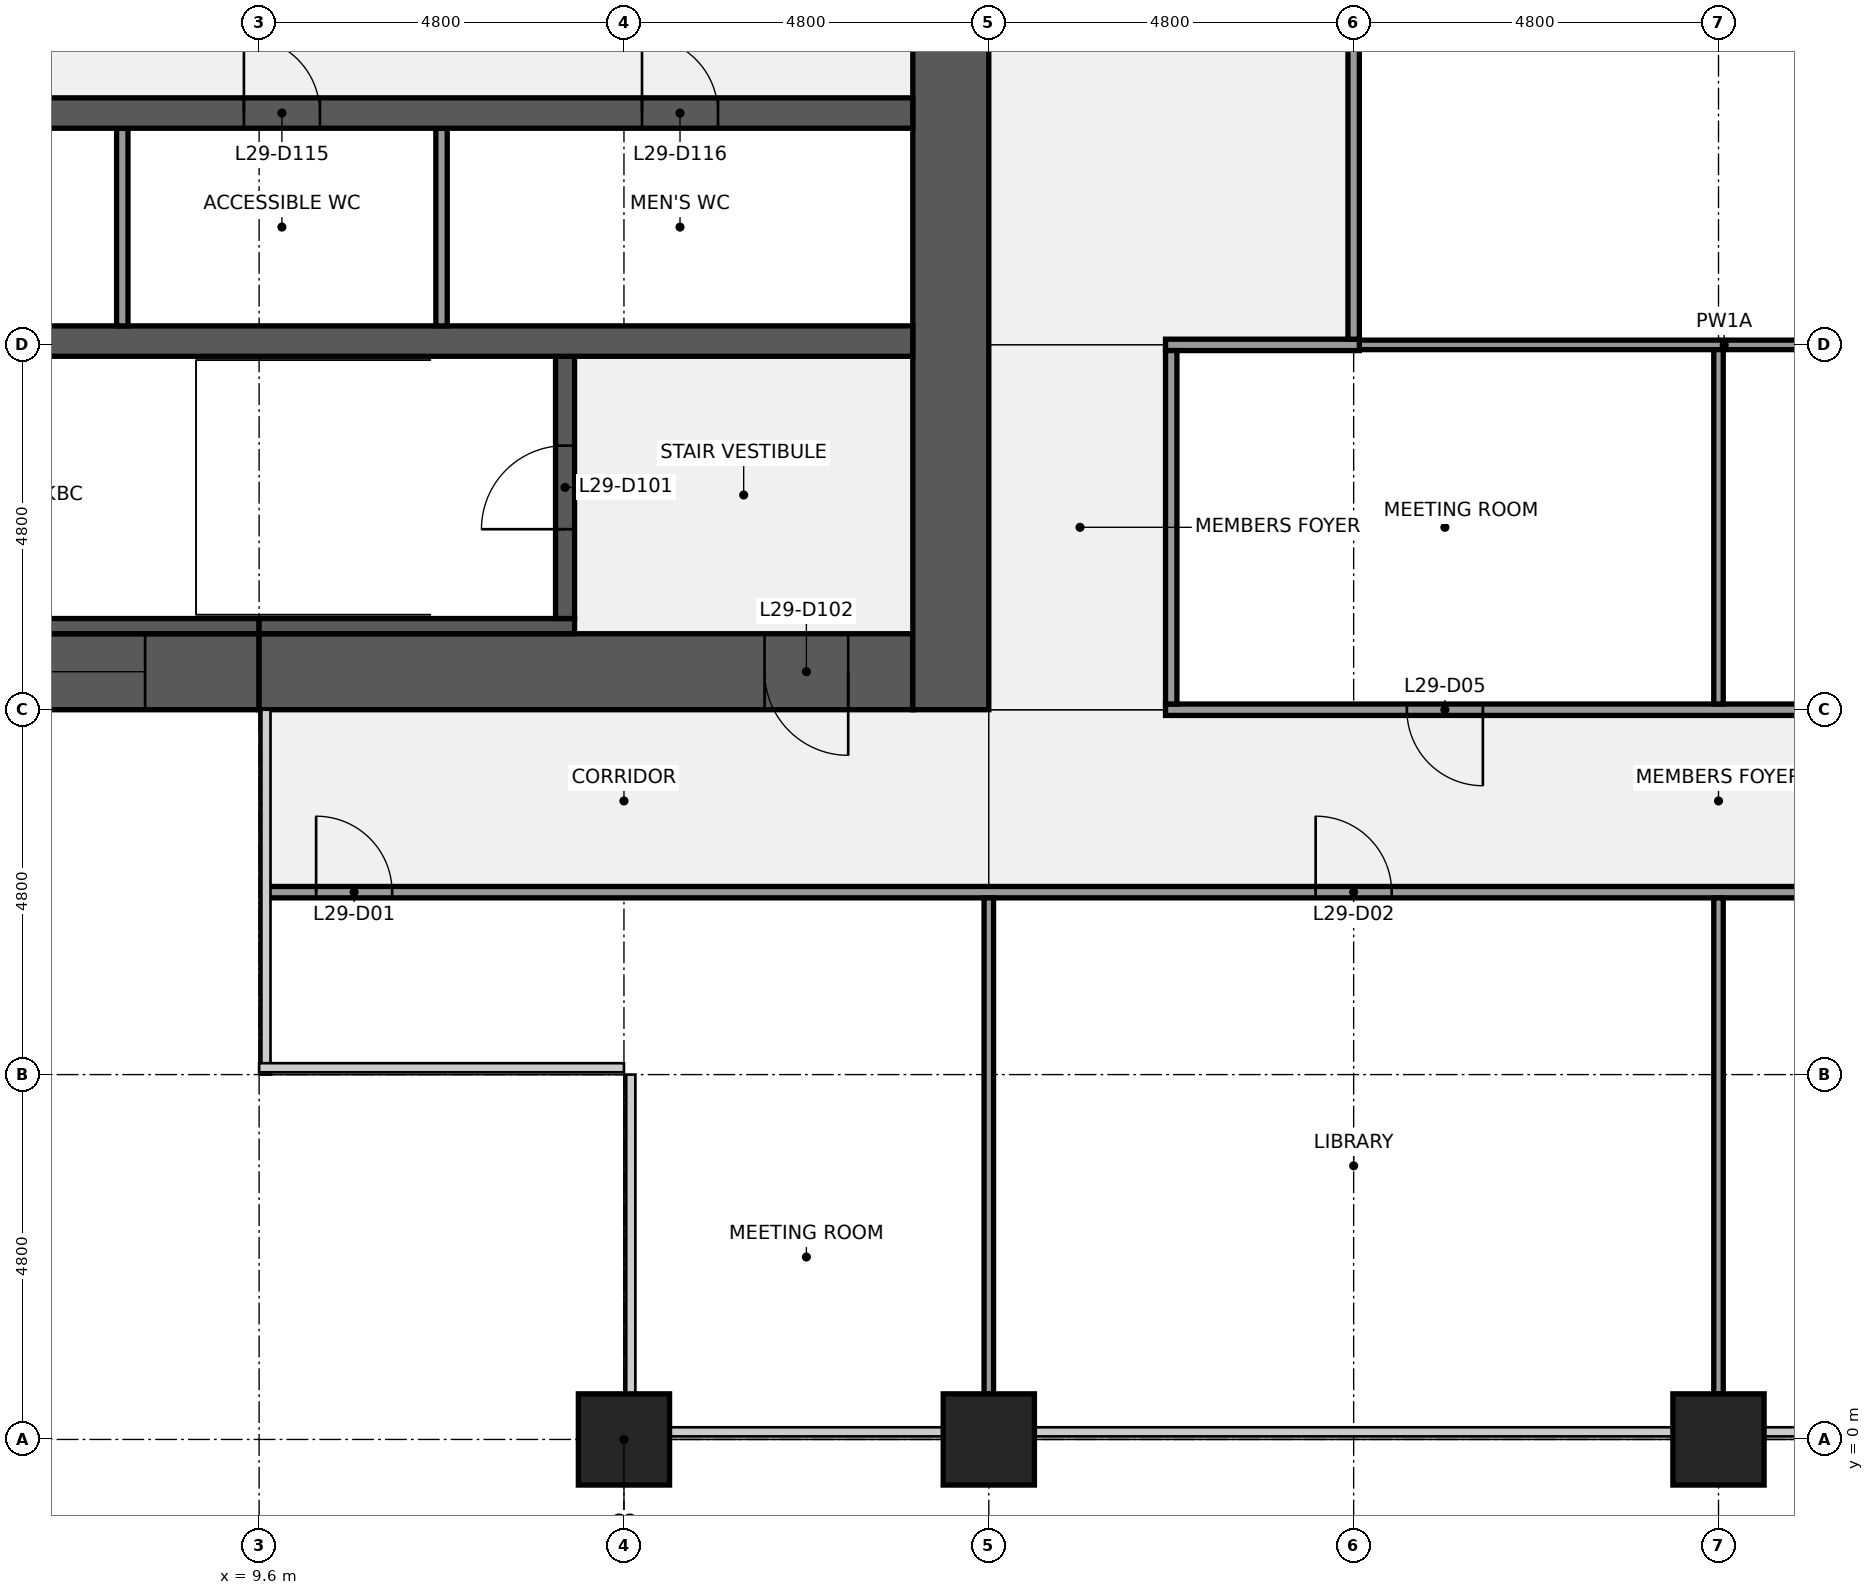
"""IFC4 building model, lengths in metres.
Left out: names, types, materials, properties, quantities, classifications, styles, units other than length and angle.
Written with IfcOpenShell. Run it as: python <this file> out.ifc"""

import sys

from ifc_helpers import new_model, si_unit, direction, frame, frame_2d, origin, origin_2d, place, context, subcontext, project, spatial, rectangle, extrude, element, fill, save


model = new_model("IFC4")
c1 = context("Model", 3, precision=1e-05, world=origin(), true_north=direction((0.0, 1.0)))
c2 = subcontext(c1, "Body", "Model", "MODEL_VIEW")
j1 = project(units=[si_unit("LENGTHUNIT", "METRE"), si_unit("PLANEANGLEUNIT", "RADIAN")], contexts=[c1])
p1 = place(None, origin())
s1 = spatial("IfcSite", under=j1, at=p1, CompositionType="ELEMENT")
p2 = place(p1, origin())
s2 = spatial("IfcBuilding", under=s1, at=p2, CompositionType="ELEMENT")
p3 = place(p2, frame((0.0, 0.0, 136.1)))
s3 = spatial("IfcBuildingStorey", under=s2, at=p3, CompositionType="ELEMENT", Elevation=136.1)
for number, where, z_axis, x_axis in (
    (1, (14.4, 0.0, 0.0), (0.0, 0.0, 1.0), (1.0, 0.0, 0.0)),
    (2, (19.2, 0.0, 0.0), (0.0, 0.0, 1.0), (1.0, 0.0, 0.0)),
    (3, (28.8, 0.0, 0.0), (0.0, 0.0, 1.0), (1.0, 0.0, 0.0)),
):
    element("IfcColumn", number, at=place(p3, frame(where, z_axis=z_axis, x_axis=x_axis)), inside=s3, PredefinedType="COLUMN", context=c2, shape_type="SweptSolid", body=[
        extrude(rectangle(XDim=1.2, YDim=1.2, at=origin_2d()), origin(), (0.0, 0.0, 1.0), 4.0),
    ])
p4 = place(p3, frame((9.6, 10.1, 0.0), z_axis=(0.0, 0.0, 1.0), x_axis=(-1.0, 0.0, 0.0)))
e4 = element("IfcWall", 4, at=p4, inside=s3, PredefinedType="SHEAR", context=c2, shape_type="SweptSolid", body=[
    extrude(rectangle(XDim=8.6, YDim=1.0, at=frame_2d((4.3, 0.0))), origin(), (0.0, 0.0, 1.0), 3.84),
])
p5 = place(p4, frame((1.5, 0.0, 0.9)))
e5 = element("IfcOpeningElement", 5, at=p5, cuts=e4, PredefinedType="OPENING", context=c2, shape_type="SweptSolid", body=[
    extrude(rectangle(XDim=1.8, YDim=1.5, at=frame_2d((0.9, 0.75))), frame((0.0, 0.51, 0.0), z_axis=(0.0, -1.0, 0.0), x_axis=(1.0, 0.0, 0.0)), (0.0, 0.0, 1.0), 1.02),
])
p6 = place(p3, frame((18.2, 10.1, 0.0), z_axis=(0.0, 0.0, 1.0), x_axis=(-1.0, 0.0, 0.0)))
e6 = element("IfcWall", 6, at=p6, inside=s3, PredefinedType="SHEAR", context=c2, shape_type="SweptSolid", body=[
    extrude(rectangle(XDim=8.6, YDim=1.0, at=frame_2d((4.3, 0.0))), origin(), (0.0, 0.0, 1.0), 3.84),
])
p7 = place(p6, frame((0.85, 0.0, 0.0)))
e7 = element("IfcOpeningElement", 7, at=p7, cuts=e6, PredefinedType="OPENING", context=c2, shape_type="SweptSolid", body=[
    extrude(rectangle(XDim=1.1, YDim=2.1, at=frame_2d((0.55, 1.05))), frame((0.0, 0.51, 0.0), z_axis=(0.0, -1.0, 0.0), x_axis=(1.0, 0.0, 0.0)), (0.0, 0.0, 1.0), 1.02),
])
p8 = place(p3, frame((18.7, 38.4, 0.0), z_axis=(0.0, 0.0, 1.0), x_axis=(0.0, -1.0, 0.0)))
e8 = element("IfcWall", 8, at=p8, inside=s3, PredefinedType="SHEAR", context=c2, shape_type="SweptSolid", body=[
    extrude(rectangle(XDim=28.8, YDim=1.0, at=frame_2d((14.4, 0.0))), origin(), (0.0, 0.0, 1.0), 3.84),
])
p9 = place(p8, frame((18.3, 0.0, 0.0)))
e9 = element("IfcOpeningElement", 9, at=p9, cuts=e8, PredefinedType="OPENING", context=c2, shape_type="SweptSolid", body=[
    extrude(rectangle(XDim=1.8, YDim=2.1, at=frame_2d((0.9, 1.05))), frame((0.0, 0.51, 0.0), z_axis=(0.0, -1.0, 0.0), x_axis=(1.0, 0.0, 0.0)), (0.0, 0.0, 1.0), 1.02),
])
p10 = place(p8, frame((8.7, 0.0, 0.0)))
e10 = element("IfcOpeningElement", 10, at=p10, cuts=e8, PredefinedType="OPENING", context=c2, shape_type="SweptSolid", body=[
    extrude(rectangle(XDim=1.8, YDim=2.1, at=frame_2d((0.9, 1.05))), frame((0.0, 0.51, 0.0), z_axis=(0.0, -1.0, 0.0), x_axis=(1.0, 0.0, 0.0)), (0.0, 0.0, 1.0), 1.02),
])
p11 = place(p3, frame((6.25, 10.7, 0.0), z_axis=(0.0, 0.0, 1.0), x_axis=(1.0, 0.0, 0.0)))
e11 = element("IfcWall", 11, at=p11, inside=s3, PredefinedType="SHEAR", context=c2, shape_type="SweptSolid", body=[
    extrude(rectangle(XDim=3.35, YDim=0.2, at=frame_2d((1.675, 0.0))), origin(), (0.0, 0.0, 1.0), 3.84),
])
p12 = place(p3, frame((9.6, 10.7, 0.0), z_axis=(0.0, 0.0, 1.0), x_axis=(1.0, 0.0, 0.0)))
e12 = element("IfcWall", 12, at=p12, inside=s3, PredefinedType="SHEAR", context=c2, shape_type="SweptSolid", body=[
    extrude(rectangle(XDim=4.15, YDim=0.2, at=frame_2d((2.075, 0.0))), origin(), (0.0, 0.0, 1.0), 3.84),
])
p13 = place(p3, frame((13.625, 10.8, 0.0), z_axis=(0.0, 0.0, 1.0), x_axis=(0.0, 1.0, 0.0)))
e13 = element("IfcWall", 13, at=p13, inside=s3, PredefinedType="SHEAR", context=c2, shape_type="SweptSolid", body=[
    extrude(rectangle(XDim=3.45, YDim=0.25, at=frame_2d((1.725, 0.0))), origin(), (0.0, 0.0, 1.0), 3.84),
])
p14 = place(p13, frame((1.175, 0.0, 0.0)))
e14 = element("IfcOpeningElement", 14, at=p14, cuts=e13, PredefinedType="OPENING", context=c2, shape_type="SweptSolid", body=[
    extrude(rectangle(XDim=1.1, YDim=2.1, at=frame_2d((0.55, 1.05))), frame((0.0, 0.135, 0.0), z_axis=(0.0, -1.0, 0.0), x_axis=(1.0, 0.0, 0.0)), (0.0, 0.0, 1.0), 0.27),
])
p15 = place(p3, frame((1.0, 14.45, 0.0), z_axis=(0.0, 0.0, 1.0), x_axis=(1.0, 0.0, 0.0)))
e15 = element("IfcWall", 15, at=p15, inside=s3, PredefinedType="SHEAR", context=c2, shape_type="SweptSolid", body=[
    extrude(rectangle(XDim=17.2, YDim=0.4, at=frame_2d((8.6, 0.0))), origin(), (0.0, 0.0, 1.0), 3.84),
])
for number, where, z_axis, x_axis in (
    (16, (7.8, 14.65, 0.0), (0.0, 0.0, 1.0), (0.0, 1.0, 0.0)),
    (17, (12.0, 14.65, 0.0), (0.0, 0.0, 1.0), (0.0, 1.0, 0.0)),
):
    element("IfcWall", number, at=place(p3, frame(where, z_axis=z_axis, x_axis=x_axis)), inside=s3, PredefinedType="PARTITIONING", context=c2, shape_type="SweptSolid", body=[
        extrude(rectangle(XDim=2.6, YDim=0.15, at=frame_2d((1.3, 0.0))), origin(), (0.0, 0.0, 1.0), 3.84),
    ])
p16 = place(p3, frame((1.0, 17.45, 0.0), z_axis=(0.0, 0.0, 1.0), x_axis=(1.0, 0.0, 0.0)))
e18 = element("IfcWall", 18, at=p16, inside=s3, PredefinedType="SHEAR", context=c2, shape_type="SweptSolid", body=[
    extrude(rectangle(XDim=17.2, YDim=0.4, at=frame_2d((8.6, 0.0))), origin(), (0.0, 0.0, 1.0), 3.84),
])
p17 = place(p16, frame((0.762, 0.0, 0.0)))
e19 = element("IfcOpeningElement", 19, at=p17, cuts=e18, PredefinedType="OPENING", context=c2, shape_type="SweptSolid", body=[
    extrude(rectangle(XDim=1.0, YDim=2.1, at=frame_2d((0.5, 1.05))), frame((0.0, 0.21, 0.0), z_axis=(0.0, -1.0, 0.0), x_axis=(1.0, 0.0, 0.0)), (0.0, 0.0, 1.0), 0.42),
])
p18 = place(p16, frame((4.2, 0.0, 0.0)))
e20 = element("IfcOpeningElement", 20, at=p18, cuts=e18, PredefinedType="OPENING", context=c2, shape_type="SweptSolid", body=[
    extrude(rectangle(XDim=1.0, YDim=2.1, at=frame_2d((0.5, 1.05))), frame((0.0, 0.21, 0.0), z_axis=(0.0, -1.0, 0.0), x_axis=(1.0, 0.0, 0.0)), (0.0, 0.0, 1.0), 0.42),
])
p19 = place(p16, frame((8.4, 0.0, 0.0)))
e21 = element("IfcOpeningElement", 21, at=p19, cuts=e18, PredefinedType="OPENING", context=c2, shape_type="SweptSolid", body=[
    extrude(rectangle(XDim=1.0, YDim=2.1, at=frame_2d((0.5, 1.05))), frame((0.0, 0.21, 0.0), z_axis=(0.0, -1.0, 0.0), x_axis=(1.0, 0.0, 0.0)), (0.0, 0.0, 1.0), 0.42),
])
p20 = place(p16, frame((13.637, 0.0, 0.0)))
e22 = element("IfcOpeningElement", 22, at=p20, cuts=e18, PredefinedType="OPENING", context=c2, shape_type="SweptSolid", body=[
    extrude(rectangle(XDim=1.0, YDim=2.1, at=frame_2d((0.5, 1.05))), frame((0.0, 0.21, 0.0), z_axis=(0.0, -1.0, 0.0), x_axis=(1.0, 0.0, 0.0)), (0.0, 0.0, 1.0), 0.42),
])
p21 = place(p3, frame((9.7, 7.2, 0.0), z_axis=(0.0, 0.0, 1.0), x_axis=(1.0, 0.0, 0.0)))
e23 = element("IfcWall", 23, at=p21, inside=s3, PredefinedType="PARTITIONING", context=c2, shape_type="SweptSolid", body=[
    extrude(rectangle(XDim=38.2, YDim=0.15, at=frame_2d((19.1, 0.0))), origin(), (0.0, 0.0, 1.0), 2.849),
])
p22 = place(p21, frame((0.65, 0.0, 0.0)))
e24 = element("IfcOpeningElement", 24, at=p22, cuts=e23, PredefinedType="OPENING", context=c2, shape_type="SweptSolid", body=[
    extrude(rectangle(XDim=1.0, YDim=2.1, at=frame_2d((0.5, 1.05))), frame((0.0, 0.085, 0.0), z_axis=(0.0, -1.0, 0.0), x_axis=(1.0, 0.0, 0.0)), (0.0, 0.0, 1.0), 0.17),
])
p23 = place(p21, frame((13.8, 0.0, 0.0)))
e25 = element("IfcOpeningElement", 25, at=p23, cuts=e23, PredefinedType="OPENING", context=c2, shape_type="SweptSolid", body=[
    extrude(rectangle(XDim=1.0, YDim=2.1, at=frame_2d((0.5, 1.05))), frame((0.0, 0.085, 0.0), z_axis=(0.0, -1.0, 0.0), x_axis=(1.0, 0.0, 0.0)), (0.0, 0.0, 1.0), 0.17),
])
p24 = place(p21, frame((23.4, 0.0, 0.0)))
e26 = element("IfcOpeningElement", 26, at=p24, cuts=e23, PredefinedType="OPENING", context=c2, shape_type="SweptSolid", body=[
    extrude(rectangle(XDim=1.0, YDim=2.1, at=frame_2d((0.5, 1.05))), frame((0.0, 0.085, 0.0), z_axis=(0.0, -1.0, 0.0), x_axis=(1.0, 0.0, 0.0)), (0.0, 0.0, 1.0), 0.17),
])
p25 = place(p21, frame((32.95, 0.0, 0.0)))
e27 = element("IfcOpeningElement", 27, at=p25, cuts=e23, PredefinedType="OPENING", context=c2, shape_type="SweptSolid", body=[
    extrude(rectangle(XDim=1.0, YDim=2.1, at=frame_2d((0.5, 1.05))), frame((0.0, 0.085, 0.0), z_axis=(0.0, -1.0, 0.0), x_axis=(1.0, 0.0, 0.0)), (0.0, 0.0, 1.0), 0.17),
])
p26 = place(p3, frame((21.525, 9.6, 0.0), z_axis=(0.0, 0.0, 1.0), x_axis=(1.0, 0.0, 0.0)))
e28 = element("IfcWall", 28, at=p26, inside=s3, PredefinedType="PARTITIONING", context=c2, shape_type="SweptSolid", body=[
    extrude(rectangle(XDim=14.55, YDim=0.15, at=frame_2d((7.275, 0.0))), origin(), (0.0, 0.0, 1.0), 2.849),
])
p27 = place(p26, frame((3.175, 0.0, 0.0)))
e29 = element("IfcOpeningElement", 29, at=p27, cuts=e28, PredefinedType="OPENING", context=c2, shape_type="SweptSolid", body=[
    extrude(rectangle(XDim=1.0, YDim=2.1, at=frame_2d((0.5, 1.05))), frame((0.0, 0.085, 0.0), z_axis=(0.0, -1.0, 0.0), x_axis=(1.0, 0.0, 0.0)), (0.0, 0.0, 1.0), 0.17),
])
p28 = place(p26, frame((10.375, 0.0, 0.0)))
e30 = element("IfcOpeningElement", 30, at=p28, cuts=e28, PredefinedType="OPENING", context=c2, shape_type="SweptSolid", body=[
    extrude(rectangle(XDim=1.0, YDim=2.1, at=frame_2d((0.5, 1.05))), frame((0.0, 0.085, 0.0), z_axis=(0.0, -1.0, 0.0), x_axis=(1.0, 0.0, 0.0)), (0.0, 0.0, 1.0), 0.17),
])
p29 = place(p3, frame((24.075, 14.4, 0.0), z_axis=(0.0, 0.0, 1.0), x_axis=(1.0, 0.0, 0.0)))
e31 = element("IfcWall", 31, at=p29, inside=s3, PredefinedType="PARTITIONING", context=c2, shape_type="SweptSolid", body=[
    extrude(rectangle(XDim=9.6, YDim=0.125, at=frame_2d((4.8, 0.0))), origin(), (0.0, 0.0, 1.0), 2.849),
])
p30 = place(p3, frame((21.525, 14.4, 0.0), z_axis=(0.0, 0.0, 1.0), x_axis=(1.0, 0.0, 0.0)))
e32 = element("IfcWall", 32, at=p30, inside=s3, PredefinedType="PARTITIONING", context=c2, shape_type="SweptSolid", body=[
    extrude(rectangle(XDim=2.55, YDim=0.15, at=frame_2d((1.275, 0.0))), origin(), (0.0, 0.0, 1.0), 2.849),
])
p31 = place(p3, frame((19.2, 0.6, 0.0), z_axis=(0.0, 0.0, 1.0), x_axis=(0.0, 1.0, 0.0)))
e33 = element("IfcWall", 33, at=p31, inside=s3, PredefinedType="PARTITIONING", context=c2, shape_type="SweptSolid", body=[
    extrude(rectangle(XDim=6.525, YDim=0.125, at=frame_2d((3.262, 0.0))), origin(), (0.0, 0.0, 1.0), 2.849),
])
p32 = place(p3, frame((21.6, 9.675, 0.0), z_axis=(0.0, 0.0, 1.0), x_axis=(0.0, 1.0, 0.0)))
e34 = element("IfcWall", 34, at=p32, inside=s3, PredefinedType="PARTITIONING", context=c2, shape_type="SweptSolid", body=[
    extrude(rectangle(XDim=4.65, YDim=0.15, at=frame_2d((2.325, 0.0))), origin(), (0.0, 0.0, 1.0), 2.849),
])
p33 = place(p3, frame((24.0, 14.475, 0.0), z_axis=(0.0, 0.0, 1.0), x_axis=(0.0, 1.0, 0.0)))
e35 = element("IfcWall", 35, at=p33, inside=s3, PredefinedType="PARTITIONING", context=c2, shape_type="SweptSolid", body=[
    extrude(rectangle(XDim=10.65, YDim=0.15, at=frame_2d((5.325, 0.0))), origin(), (0.0, 0.0, 1.0), 2.849),
])
p34 = place(p33, frame((4.825, 0.0, 0.0)))
e36 = element("IfcOpeningElement", 36, at=p34, cuts=e35, PredefinedType="OPENING", context=c2, shape_type="SweptSolid", body=[
    extrude(rectangle(XDim=1.0, YDim=2.1, at=frame_2d((0.5, 1.05))), frame((0.0, 0.085, 0.0), z_axis=(0.0, -1.0, 0.0), x_axis=(1.0, 0.0, 0.0)), (0.0, 0.0, 1.0), 0.17),
])
p35 = place(p3, frame((28.8, 0.6, 0.0), z_axis=(0.0, 0.0, 1.0), x_axis=(0.0, 1.0, 0.0)))
e37 = element("IfcWall", 37, at=p35, inside=s3, PredefinedType="PARTITIONING", context=c2, shape_type="SweptSolid", body=[
    extrude(rectangle(XDim=6.525, YDim=0.125, at=frame_2d((3.262, 0.0))), origin(), (0.0, 0.0, 1.0), 2.849),
])
p36 = place(p3, frame((28.8, 9.675, 0.0), z_axis=(0.0, 0.0, 1.0), x_axis=(0.0, 1.0, 0.0)))
e38 = element("IfcWall", 38, at=p36, inside=s3, PredefinedType="PARTITIONING", context=c2, shape_type="SweptSolid", body=[
    extrude(rectangle(XDim=4.662, YDim=0.125, at=frame_2d((2.331, 0.0))), origin(), (0.0, 0.0, 1.0), 2.849),
])
for number, where, z_axis, x_axis in (
    (39, (14.4, -1.05, 0.0), (0.0, 0.0, 1.0), (1.0, 0.0, 0.0)),
    (40, (19.2, -1.05, 0.0), (0.0, 0.0, 1.0), (1.0, 0.0, 0.0)),
):
    element("IfcColumn", number, at=place(p3, frame(where, z_axis=z_axis, x_axis=x_axis)), inside=s3, PredefinedType="PILASTER", context=c2, shape_type="SweptSolid", body=[
        extrude(rectangle(XDim=3.6, YDim=0.9, at=origin_2d()), origin(), (0.0, 0.0, 1.0), 4.0),
    ])
p37 = place(p14, origin())
e41 = element("IfcDoor", 41, at=p37, inside=s3, OperationType="SINGLE_SWING_LEFT", PredefinedType="DOOR", context=c2, shape_type="SweptSolid", body=[
    extrude(rectangle(XDim=1.1, YDim=2.1, at=frame_2d((0.55, 1.05))), frame((0.0, 0.025, 0.0), z_axis=(0.0, -1.0, 0.0), x_axis=(1.0, 0.0, 0.0)), (0.0, 0.0, 1.0), 0.05),
])
fill(e14, e41)
p38 = place(p7, origin())
e42 = element("IfcDoor", 42, at=p38, inside=s3, OperationType="SINGLE_SWING_LEFT", PredefinedType="DOOR", context=c2, shape_type="SweptSolid", body=[
    extrude(rectangle(XDim=1.1, YDim=2.1, at=frame_2d((0.55, 1.05))), frame((0.0, 0.025, 0.0), z_axis=(0.0, -1.0, 0.0), x_axis=(1.0, 0.0, 0.0)), (0.0, 0.0, 1.0), 0.05),
])
fill(e7, e42)
p39 = place(p19, origin())
e43 = element("IfcDoor", 43, at=p39, inside=s3, OperationType="SINGLE_SWING_LEFT", PredefinedType="DOOR", context=c2, shape_type="SweptSolid", body=[
    extrude(rectangle(XDim=1.0, YDim=2.1, at=frame_2d((0.5, 1.05))), frame((0.0, 0.025, 0.0), z_axis=(0.0, -1.0, 0.0), x_axis=(1.0, 0.0, 0.0)), (0.0, 0.0, 1.0), 0.05),
])
fill(e21, e43)
p40 = place(p20, origin())
e44 = element("IfcDoor", 44, at=p40, inside=s3, OperationType="SINGLE_SWING_LEFT", PredefinedType="DOOR", context=c2, shape_type="SweptSolid", body=[
    extrude(rectangle(XDim=1.0, YDim=2.1, at=frame_2d((0.5, 1.05))), frame((0.0, 0.025, 0.0), z_axis=(0.0, -1.0, 0.0), x_axis=(1.0, 0.0, 0.0)), (0.0, 0.0, 1.0), 0.05),
])
fill(e22, e44)
p41 = place(p5, origin())
e45 = element("IfcWindow", 45, at=p41, inside=s3, PartitioningType="SINGLE_PANEL", PredefinedType="WINDOW", context=c2, shape_type="SweptSolid", body=[
    extrude(rectangle(XDim=1.8, YDim=1.5, at=frame_2d((0.9, 0.75))), frame((0.0, 0.03, 0.0), z_axis=(0.0, -1.0, 0.0), x_axis=(1.0, 0.0, 0.0)), (0.0, 0.0, 1.0), 0.06),
])
fill(e5, e45)
p42 = place(p22, origin())
e46 = element("IfcDoor", 46, at=p42, inside=s3, OperationType="SINGLE_SWING_LEFT", PredefinedType="DOOR", context=c2, shape_type="SweptSolid", body=[
    extrude(rectangle(XDim=1.0, YDim=2.1, at=frame_2d((0.5, 1.05))), frame((0.0, 0.025, 0.0), z_axis=(0.0, -1.0, 0.0), x_axis=(1.0, 0.0, 0.0)), (0.0, 0.0, 1.0), 0.05),
])
fill(e24, e46)
p43 = place(p23, origin())
e47 = element("IfcDoor", 47, at=p43, inside=s3, OperationType="SINGLE_SWING_LEFT", PredefinedType="DOOR", context=c2, shape_type="SweptSolid", body=[
    extrude(rectangle(XDim=1.0, YDim=2.1, at=frame_2d((0.5, 1.05))), frame((0.0, 0.025, 0.0), z_axis=(0.0, -1.0, 0.0), x_axis=(1.0, 0.0, 0.0)), (0.0, 0.0, 1.0), 0.05),
])
fill(e25, e47)
p44 = place(p27, origin())
e48 = element("IfcDoor", 48, at=p44, inside=s3, OperationType="SINGLE_SWING_RIGHT", PredefinedType="DOOR", context=c2, shape_type="SweptSolid", body=[
    extrude(rectangle(XDim=1.0, YDim=2.1, at=frame_2d((0.5, 1.05))), frame((0.0, 0.025, 0.0), z_axis=(0.0, -1.0, 0.0), x_axis=(1.0, 0.0, 0.0)), (0.0, 0.0, 1.0), 0.05),
])
fill(e29, e48)
save(model, sys.argv[1])
